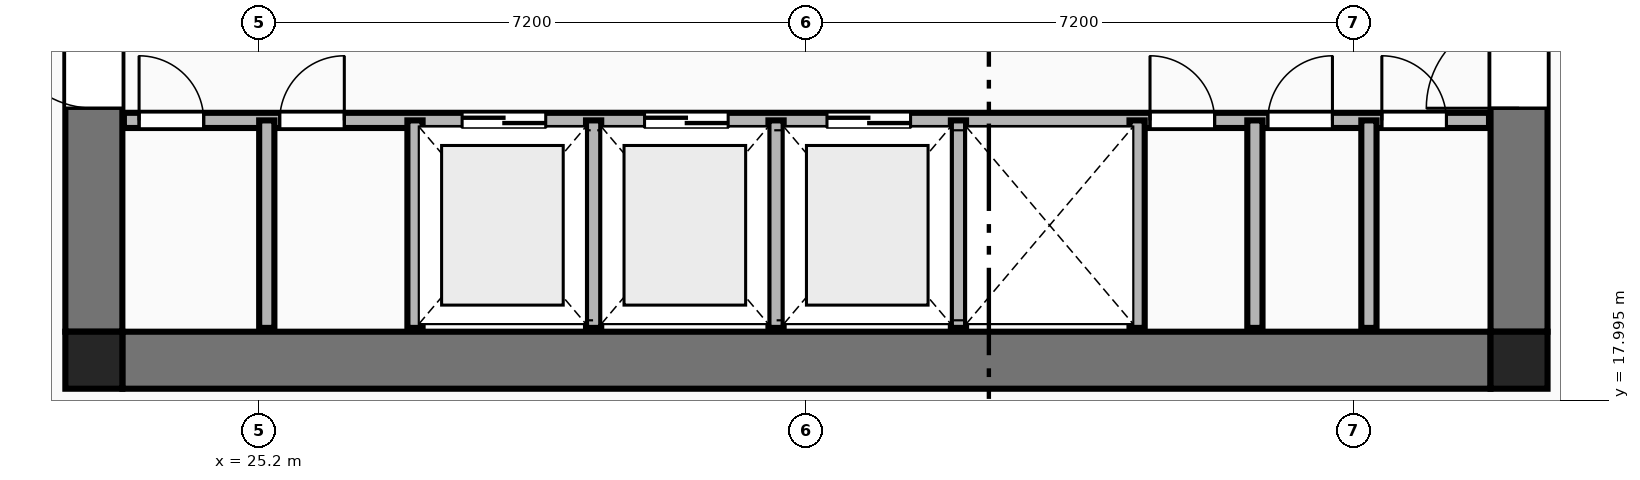
"""IFC4 building model, lengths in metres.
Left out: names, types, materials, properties, quantities, classifications, styles, units other than length and angle.
Written with IfcOpenShell. Run it as: python <this file> out.ifc"""

import sys

from ifc_helpers import new_model, si_unit, direction, frame, frame_2d, origin, origin_2d, place, context, subcontext, project, spatial, rectangle, extrude, element, fill, save


model = new_model("IFC4")
c1 = context("Model", 3, precision=1e-05, world=origin(), true_north=direction((0.0, 1.0)))
c2 = subcontext(c1, "Body", "Model", "MODEL_VIEW")
j1 = project(units=[si_unit("LENGTHUNIT", "METRE"), si_unit("PLANEANGLEUNIT", "RADIAN")], contexts=[c1])
p1 = place(None, origin())
s1 = spatial("IfcSite", under=j1, at=p1, CompositionType="ELEMENT")
p2 = place(p1, origin())
s2 = spatial("IfcBuilding", under=s1, at=p2, CompositionType="ELEMENT")
p3 = place(p2, frame((0.0, 0.0, 90.65)))
s3 = spatial("IfcBuildingStorey", under=s2, at=p3, CompositionType="ELEMENT", Elevation=90.65)
for number, where, z_axis, x_axis in (
    (1, (23.025, 18.525, 0.0), (0.0, 0.0, 1.0), (1.0, 0.0, 0.0)),
    (2, (41.775, 18.525, 0.0), (0.0, 0.0, 1.0), (1.0, 0.0, 0.0)),
):
    element("IfcColumn", number, at=place(p3, frame(where, z_axis=z_axis, x_axis=x_axis)), inside=s3, PredefinedType="COLUMN", context=c2, shape_type="SweptSolid", body=[
        extrude(rectangle(XDim=0.75, YDim=0.75, at=origin_2d()), origin(), (0.0, 0.0, 1.0), 3.55),
    ])
p4 = place(p3, frame((23.4, 18.525, 0.0), z_axis=(0.0, 0.0, 1.0), x_axis=(1.0, 0.0, 0.0)))
e3 = element("IfcWall", 3, at=p4, inside=s3, PredefinedType="SHEAR", context=c2, shape_type="SweptSolid", body=[
    extrude(rectangle(XDim=18.0, YDim=0.75, at=frame_2d((9.0, 0.0))), origin(), (0.0, 0.0, 1.0), 3.33),
])
p5 = place(p3, frame((23.025, 18.9, 0.0), z_axis=(0.0, 0.0, 1.0), x_axis=(0.0, 1.0, 0.0)))
e4 = element("IfcWall", 4, at=p5, inside=s3, PredefinedType="SHEAR", context=c2, shape_type="SweptSolid", body=[
    extrude(rectangle(XDim=14.0, YDim=0.75, at=frame_2d((7.0, 0.0))), origin(), (0.0, 0.0, 1.0), 3.33),
])
p6 = place(p5, frame((2.94, 0.0, 0.0)))
e5 = element("IfcOpeningElement", 5, at=p6, cuts=e4, PredefinedType="OPENING", context=c2, shape_type="SweptSolid", body=[
    extrude(rectangle(XDim=1.22, YDim=2.25, at=frame_2d((0.61, 1.125))), frame((0.0, 0.385, 0.0), z_axis=(0.0, -1.0, 0.0), x_axis=(1.0, 0.0, 0.0)), (0.0, 0.0, 1.0), 0.77),
])
p7 = place(p3, frame((41.775, 18.9, 0.0), z_axis=(0.0, 0.0, 1.0), x_axis=(0.0, 1.0, 0.0)))
e6 = element("IfcWall", 6, at=p7, inside=s3, PredefinedType="SHEAR", context=c2, shape_type="SweptSolid", body=[
    extrude(rectangle(XDim=14.0, YDim=0.75, at=frame_2d((7.0, 0.0))), origin(), (0.0, 0.0, 1.0), 3.33),
])
p8 = place(p7, frame((2.94, 0.0, 0.0)))
e7 = element("IfcOpeningElement", 7, at=p8, cuts=e6, PredefinedType="OPENING", context=c2, shape_type="SweptSolid", body=[
    extrude(rectangle(XDim=1.22, YDim=2.25, at=frame_2d((0.61, 1.125))), frame((0.0, 0.385, 0.0), z_axis=(0.0, -1.0, 0.0), x_axis=(1.0, 0.0, 0.0)), (0.0, 0.0, 1.0), 0.77),
])
p9 = place(p3, frame((23.42, 21.68, 0.0), z_axis=(0.0, 0.0, 1.0), x_axis=(1.0, 0.0, 0.0)))
e8 = element("IfcWall", 8, at=p9, inside=s3, PredefinedType="PLUMBINGWALL", context=c2, shape_type="SweptSolid", body=[
    extrude(rectangle(XDim=17.96, YDim=0.2, at=frame_2d((8.98, 0.0))), origin(), (0.0, 0.0, 1.0), 3.33),
])
p10 = place(p9, frame((4.45, 0.0, 0.0)))
e9 = element("IfcOpeningElement", 9, at=p10, cuts=e8, PredefinedType="OPENING", context=c2, shape_type="SweptSolid", body=[
    extrude(rectangle(XDim=1.1, YDim=2.2, at=frame_2d((0.55, 1.1))), frame((0.0, 0.11, 0.0), z_axis=(0.0, -1.0, 0.0), x_axis=(1.0, 0.0, 0.0)), (0.0, 0.0, 1.0), 0.22),
])
p11 = place(p9, frame((6.85, 0.0, 0.0)))
e10 = element("IfcOpeningElement", 10, at=p11, cuts=e8, PredefinedType="OPENING", context=c2, shape_type="SweptSolid", body=[
    extrude(rectangle(XDim=1.1, YDim=2.2, at=frame_2d((0.55, 1.1))), frame((0.0, 0.11, 0.0), z_axis=(0.0, -1.0, 0.0), x_axis=(1.0, 0.0, 0.0)), (0.0, 0.0, 1.0), 0.22),
])
p12 = place(p9, frame((9.25, 0.0, 0.0)))
e11 = element("IfcOpeningElement", 11, at=p12, cuts=e8, PredefinedType="OPENING", context=c2, shape_type="SweptSolid", body=[
    extrude(rectangle(XDim=1.1, YDim=2.2, at=frame_2d((0.55, 1.1))), frame((0.0, 0.11, 0.0), z_axis=(0.0, -1.0, 0.0), x_axis=(1.0, 0.0, 0.0)), (0.0, 0.0, 1.0), 0.22),
])
p13 = place(p9, frame((0.2, 0.0, 0.0)))
e12 = element("IfcOpeningElement", 12, at=p13, cuts=e8, PredefinedType="OPENING", context=c2, shape_type="SweptSolid", body=[
    extrude(rectangle(XDim=0.85, YDim=2.05, at=frame_2d((0.425, 1.025))), frame((0.0, 0.11, 0.0), z_axis=(0.0, -1.0, 0.0), x_axis=(1.0, 0.0, 0.0)), (0.0, 0.0, 1.0), 0.22),
])
p14 = place(p9, frame((2.05, 0.0, 0.0)))
e13 = element("IfcOpeningElement", 13, at=p14, cuts=e8, PredefinedType="OPENING", context=c2, shape_type="SweptSolid", body=[
    extrude(rectangle(XDim=0.85, YDim=2.05, at=frame_2d((0.425, 1.025))), frame((0.0, 0.11, 0.0), z_axis=(0.0, -1.0, 0.0), x_axis=(1.0, 0.0, 0.0)), (0.0, 0.0, 1.0), 0.22),
])
p15 = place(p9, frame((13.5, 0.0, 0.0)))
e14 = element("IfcOpeningElement", 14, at=p15, cuts=e8, PredefinedType="OPENING", context=c2, shape_type="SweptSolid", body=[
    extrude(rectangle(XDim=0.85, YDim=2.05, at=frame_2d((0.425, 1.025))), frame((0.0, 0.11, 0.0), z_axis=(0.0, -1.0, 0.0), x_axis=(1.0, 0.0, 0.0)), (0.0, 0.0, 1.0), 0.22),
])
p16 = place(p9, frame((15.05, 0.0, 0.0)))
e15 = element("IfcOpeningElement", 15, at=p16, cuts=e8, PredefinedType="OPENING", context=c2, shape_type="SweptSolid", body=[
    extrude(rectangle(XDim=0.85, YDim=2.05, at=frame_2d((0.425, 1.025))), frame((0.0, 0.11, 0.0), z_axis=(0.0, -1.0, 0.0), x_axis=(1.0, 0.0, 0.0)), (0.0, 0.0, 1.0), 0.22),
])
p17 = place(p9, frame((16.55, 0.0, 0.0)))
e16 = element("IfcOpeningElement", 16, at=p17, cuts=e8, PredefinedType="OPENING", context=c2, shape_type="SweptSolid", body=[
    extrude(rectangle(XDim=0.85, YDim=2.05, at=frame_2d((0.425, 1.025))), frame((0.0, 0.11, 0.0), z_axis=(0.0, -1.0, 0.0), x_axis=(1.0, 0.0, 0.0)), (0.0, 0.0, 1.0), 0.22),
])
for number, where, z_axis, x_axis in (
    (17, (27.25, 18.95, 0.0), (0.0, 0.0, 1.0), (0.0, 1.0, 0.0)),
    (18, (29.6, 18.95, 0.0), (0.0, 0.0, 1.0), (0.0, 1.0, 0.0)),
    (19, (32.0, 18.95, 0.0), (0.0, 0.0, 1.0), (0.0, 1.0, 0.0)),
    (20, (34.4, 18.95, 0.0), (0.0, 0.0, 1.0), (0.0, 1.0, 0.0)),
    (21, (36.75, 18.95, 0.0), (0.0, 0.0, 1.0), (0.0, 1.0, 0.0)),
    (22, (25.3, 18.95, 0.0), (0.0, 0.0, 1.0), (0.0, 1.0, 0.0)),
    (23, (38.3, 18.95, 0.0), (0.0, 0.0, 1.0), (0.0, 1.0, 0.0)),
    (24, (39.8, 18.95, 0.0), (0.0, 0.0, 1.0), (0.0, 1.0, 0.0)),
):
    element("IfcWall", number, at=place(p3, frame(where, z_axis=z_axis, x_axis=x_axis)), inside=s3, PredefinedType="PLUMBINGWALL", context=c2, shape_type="SweptSolid", body=[
        extrude(rectangle(XDim=2.73, YDim=0.2, at=frame_2d((1.365, 0.0))), origin(), (0.0, 0.0, 1.0), 3.33),
    ])
p18 = place(p6, origin())
e25 = element("IfcDoor", 25, at=p18, inside=s3, OperationType="SINGLE_SWING_RIGHT", PredefinedType="DOOR", context=c2, shape_type="SweptSolid", body=[
    extrude(rectangle(XDim=1.22, YDim=2.25, at=frame_2d((0.61, 1.125))), frame((0.0, 0.025, 0.0), z_axis=(0.0, -1.0, 0.0), x_axis=(1.0, 0.0, 0.0)), (0.0, 0.0, 1.0), 0.05),
])
fill(e5, e25)
p19 = place(p8, origin())
e26 = element("IfcDoor", 26, at=p19, inside=s3, OperationType="SINGLE_SWING_LEFT", PredefinedType="DOOR", context=c2, shape_type="SweptSolid", body=[
    extrude(rectangle(XDim=1.22, YDim=2.25, at=frame_2d((0.61, 1.125))), frame((0.0, 0.025, 0.0), z_axis=(0.0, -1.0, 0.0), x_axis=(1.0, 0.0, 0.0)), (0.0, 0.0, 1.0), 0.05),
])
fill(e7, e26)
p20 = place(p10, origin())
e27 = element("IfcDoor", 27, at=p20, inside=s3, OperationType="DOUBLE_DOOR_SLIDING", PredefinedType="DOOR", context=c2, shape_type="SweptSolid", body=[
    extrude(rectangle(XDim=1.1, YDim=2.2, at=frame_2d((0.55, 1.1))), frame((0.0, 0.025, 0.0), z_axis=(0.0, -1.0, 0.0), x_axis=(1.0, 0.0, 0.0)), (0.0, 0.0, 1.0), 0.05),
])
fill(e9, e27)
p21 = place(p11, origin())
e28 = element("IfcDoor", 28, at=p21, inside=s3, OperationType="DOUBLE_DOOR_SLIDING", PredefinedType="DOOR", context=c2, shape_type="SweptSolid", body=[
    extrude(rectangle(XDim=1.1, YDim=2.2, at=frame_2d((0.55, 1.1))), frame((0.0, 0.025, 0.0), z_axis=(0.0, -1.0, 0.0), x_axis=(1.0, 0.0, 0.0)), (0.0, 0.0, 1.0), 0.05),
])
fill(e10, e28)
p22 = place(p12, origin())
e29 = element("IfcDoor", 29, at=p22, inside=s3, OperationType="DOUBLE_DOOR_SLIDING", PredefinedType="DOOR", context=c2, shape_type="SweptSolid", body=[
    extrude(rectangle(XDim=1.1, YDim=2.2, at=frame_2d((0.55, 1.1))), frame((0.0, 0.025, 0.0), z_axis=(0.0, -1.0, 0.0), x_axis=(1.0, 0.0, 0.0)), (0.0, 0.0, 1.0), 0.05),
])
fill(e11, e29)
p23 = place(p13, origin())
e30 = element("IfcDoor", 30, at=p23, inside=s3, OperationType="SINGLE_SWING_LEFT", PredefinedType="DOOR", context=c2, shape_type="SweptSolid", body=[
    extrude(rectangle(XDim=0.85, YDim=2.05, at=frame_2d((0.425, 1.025))), frame((0.0, 0.025, 0.0), z_axis=(0.0, -1.0, 0.0), x_axis=(1.0, 0.0, 0.0)), (0.0, 0.0, 1.0), 0.05),
])
fill(e12, e30)
p24 = place(p14, origin())
e31 = element("IfcDoor", 31, at=p24, inside=s3, OperationType="SINGLE_SWING_RIGHT", PredefinedType="DOOR", context=c2, shape_type="SweptSolid", body=[
    extrude(rectangle(XDim=0.85, YDim=2.05, at=frame_2d((0.425, 1.025))), frame((0.0, 0.025, 0.0), z_axis=(0.0, -1.0, 0.0), x_axis=(1.0, 0.0, 0.0)), (0.0, 0.0, 1.0), 0.05),
])
fill(e13, e31)
p25 = place(p15, origin())
e32 = element("IfcDoor", 32, at=p25, inside=s3, OperationType="SINGLE_SWING_LEFT", PredefinedType="DOOR", context=c2, shape_type="SweptSolid", body=[
    extrude(rectangle(XDim=0.85, YDim=2.05, at=frame_2d((0.425, 1.025))), frame((0.0, 0.025, 0.0), z_axis=(0.0, -1.0, 0.0), x_axis=(1.0, 0.0, 0.0)), (0.0, 0.0, 1.0), 0.05),
])
fill(e14, e32)
p26 = place(p16, origin())
e33 = element("IfcDoor", 33, at=p26, inside=s3, OperationType="SINGLE_SWING_RIGHT", PredefinedType="DOOR", context=c2, shape_type="SweptSolid", body=[
    extrude(rectangle(XDim=0.85, YDim=2.05, at=frame_2d((0.425, 1.025))), frame((0.0, 0.025, 0.0), z_axis=(0.0, -1.0, 0.0), x_axis=(1.0, 0.0, 0.0)), (0.0, 0.0, 1.0), 0.05),
])
fill(e15, e33)
p27 = place(p17, origin())
e34 = element("IfcDoor", 34, at=p27, inside=s3, OperationType="SINGLE_SWING_LEFT", PredefinedType="DOOR", context=c2, shape_type="SweptSolid", body=[
    extrude(rectangle(XDim=0.85, YDim=2.05, at=frame_2d((0.425, 1.025))), frame((0.0, 0.025, 0.0), z_axis=(0.0, -1.0, 0.0), x_axis=(1.0, 0.0, 0.0)), (0.0, 0.0, 1.0), 0.05),
])
fill(e16, e34)
save(model, sys.argv[1])
